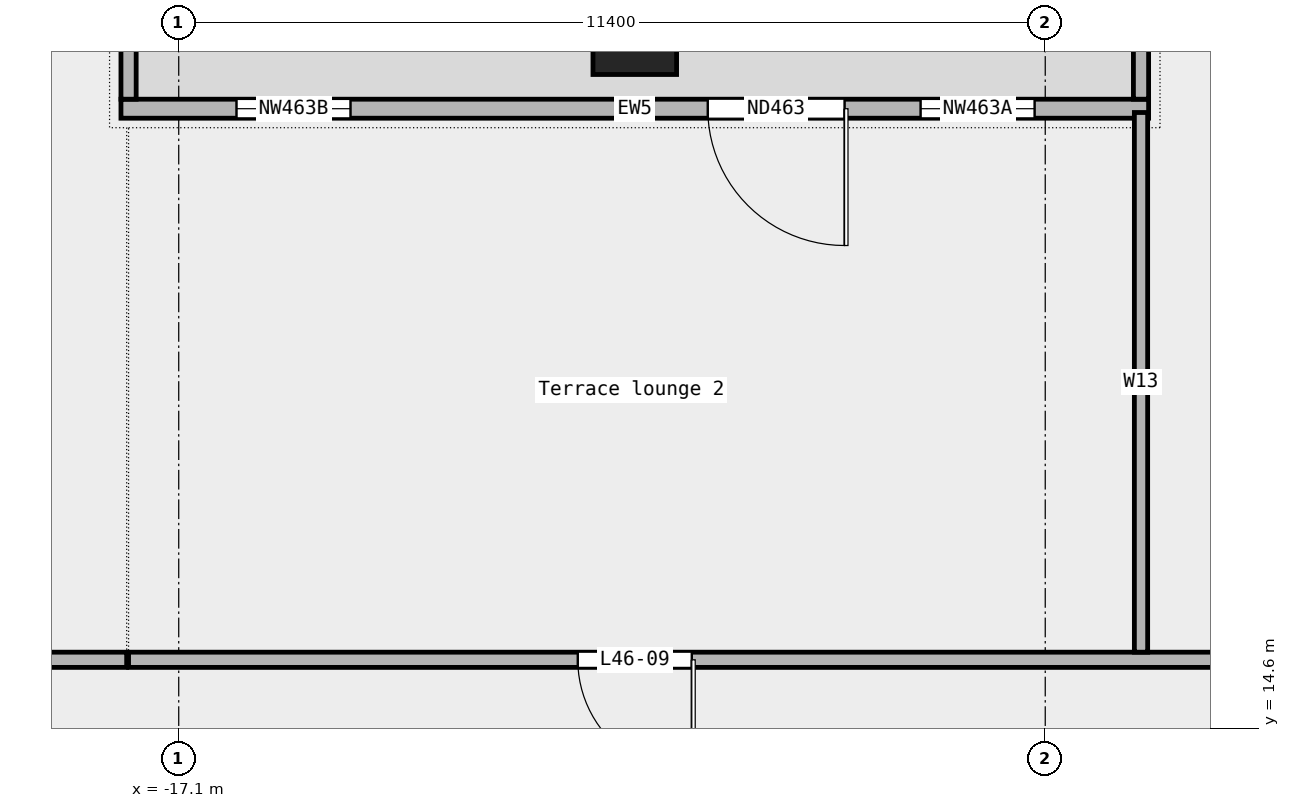
"""IFC4 building model, lengths in metres.
Left out: names, types, materials, properties, quantities, classifications, styles, units other than length and angle.
Written with IfcOpenShell. Run it as: python <this file> out.ifc"""

import sys

from ifc_helpers import new_model, si_unit, direction, frame, frame_2d, origin, origin_2d, place, context, subcontext, project, spatial, rectangle, extrude, element, fill, save


model = new_model("IFC4")
c1 = context("Model", 3, precision=1e-05, world=origin(), true_north=direction((0.0, 1.0)))
c2 = subcontext(c1, "Body", "Model", "MODEL_VIEW")
j1 = project(units=[si_unit("LENGTHUNIT", "METRE"), si_unit("PLANEANGLEUNIT", "RADIAN")], contexts=[c1])
p1 = place(None, origin())
s1 = spatial("IfcSite", under=j1, at=p1, CompositionType="ELEMENT")
p2 = place(p1, origin())
s2 = spatial("IfcBuilding", under=s1, at=p2, CompositionType="ELEMENT")
p3 = place(p2, frame((0.0, 0.0, 219.0)))
s3 = spatial("IfcBuildingStorey", under=s2, at=p3, CompositionType="ELEMENT", Elevation=219.0)
p4 = place(p3, frame((-11.1, 23.75, 0.0), z_axis=(0.0, 0.0, 1.0), x_axis=(1.0, 0.0, 0.0)))
e1 = element("IfcColumn", 1, at=p4, inside=s3, PredefinedType="COLUMN", context=c2, shape_type="SweptSolid", body=[
    extrude(rectangle(XDim=1.1, YDim=1.1, at=origin_2d()), origin(), (0.0, 0.0, 1.0), 3.6),
])
p5 = place(p3, frame((-4.34, 22.75, 0.0), z_axis=(0.0, 0.0, 1.0), x_axis=(-1.0, 0.0, 0.0)))
e2 = element("IfcWall", 2, at=p5, inside=s3, PredefinedType="STANDARD", context=c2, shape_type="SweptSolid", body=[
    extrude(rectangle(XDim=13.52, YDim=0.25, at=frame_2d((6.76, 0.0))), origin(), (0.0, 0.0, 1.0), 3.6),
])
p6 = place(p5, frame((1.5, 0.0, 0.45)))
e3 = element("IfcOpeningElement", 3, at=p6, cuts=e2, PredefinedType="OPENING", context=c2, shape_type="SweptSolid", body=[
    extrude(rectangle(XDim=1.5, YDim=2.4, at=frame_2d((0.75, 1.2))), frame((0.0, 0.137, 0.0), z_axis=(0.0, -1.0, 0.0), x_axis=(1.0, 0.0, 0.0)), (0.0, 0.0, 1.0), 0.274),
])
p7 = place(p5, frame((4.0, 0.0, 0.0)))
e4 = element("IfcOpeningElement", 4, at=p7, cuts=e2, PredefinedType="OPENING", context=c2, shape_type="SweptSolid", body=[
    extrude(rectangle(XDim=1.8, YDim=2.4, at=frame_2d((0.9, 1.2))), frame((0.0, 0.137, 0.0), z_axis=(0.0, -1.0, 0.0), x_axis=(1.0, 0.0, 0.0)), (0.0, 0.0, 1.0), 0.274),
])
p8 = place(p5, frame((10.5, 0.0, 0.45)))
e5 = element("IfcOpeningElement", 5, at=p8, cuts=e2, PredefinedType="OPENING", context=c2, shape_type="SweptSolid", body=[
    extrude(rectangle(XDim=1.5, YDim=2.4, at=frame_2d((0.75, 1.2))), frame((0.0, 0.137, 0.0), z_axis=(0.0, -1.0, 0.0), x_axis=(1.0, 0.0, 0.0)), (0.0, 0.0, 1.0), 0.274),
])
for number, where, z_axis, x_axis in (
    (6, (-4.44, 24.75, 0.0), (0.0, 0.0, 1.0), (0.0, -1.0, 0.0)),
    (7, (-17.76, 24.75, 0.0), (0.0, 0.0, 1.0), (0.0, -1.0, 0.0)),
):
    element("IfcWall", number, at=place(p3, frame(where, z_axis=z_axis, x_axis=x_axis)), inside=s3, PredefinedType="STANDARD", context=c2, shape_type="SweptSolid", body=[
        extrude(rectangle(XDim=1.875, YDim=0.2, at=frame_2d((0.938, 0.0))), origin(), (0.0, 0.0, 1.0), 3.6),
    ])
p9 = place(p3, frame((-28.15, 15.5, 0.0), z_axis=(0.0, 0.0, 1.0), x_axis=(1.0, 0.0, 0.0)))
e8 = element("IfcWall", 8, at=p9, inside=s3, PredefinedType="PARTITIONING", context=c2, shape_type="SweptSolid", body=[
    extrude(rectangle(XDim=10.365, YDim=0.2, at=frame_2d((5.183, 0.0))), origin(), (0.0, 0.0, 1.0), 3.6),
])
p10 = place(p9, frame((4.683, 0.0, 0.0)))
e9 = element("IfcOpeningElement", 9, at=p10, cuts=e8, PredefinedType="OPENING", context=c2, shape_type="SweptSolid", body=[
    extrude(rectangle(XDim=1.2, YDim=2.1, at=frame_2d((0.6, 1.05))), frame((0.0, 0.112, 0.0), z_axis=(0.0, -1.0, 0.0), x_axis=(1.0, 0.0, 0.0)), (0.0, 0.0, 1.0), 0.224),
])
p11 = place(p3, frame((-17.76, 15.5, 0.0), z_axis=(0.0, 0.0, 1.0), x_axis=(1.0, 0.0, 0.0)))
e10 = element("IfcWall", 10, at=p11, inside=s3, PredefinedType="PARTITIONING", context=c2, shape_type="SweptSolid", body=[
    extrude(rectangle(XDim=45.91, YDim=0.2, at=frame_2d((22.955, 0.0))), origin(), (0.0, 0.0, 1.0), 3.6),
])
p12 = place(p11, frame((37.337, 0.0, 0.0)))
e11 = element("IfcOpeningElement", 11, at=p12, cuts=e10, PredefinedType="OPENING", context=c2, shape_type="SweptSolid", body=[
    extrude(rectangle(XDim=1.5, YDim=2.1, at=frame_2d((0.75, 1.05))), frame((0.0, 0.112, 0.0), z_axis=(0.0, -1.0, 0.0), x_axis=(1.0, 0.0, 0.0)), (0.0, 0.0, 1.0), 0.224),
])
p13 = place(p11, frame((24.633, 0.0, 0.0)))
e12 = element("IfcOpeningElement", 12, at=p13, cuts=e10, PredefinedType="OPENING", context=c2, shape_type="SweptSolid", body=[
    extrude(rectangle(XDim=1.5, YDim=2.1, at=frame_2d((0.75, 1.05))), frame((0.0, 0.112, 0.0), z_axis=(0.0, -1.0, 0.0), x_axis=(1.0, 0.0, 0.0)), (0.0, 0.0, 1.0), 0.224),
])
p14 = place(p11, frame((5.91, 0.0, 0.0)))
e13 = element("IfcOpeningElement", 13, at=p14, cuts=e10, PredefinedType="OPENING", context=c2, shape_type="SweptSolid", body=[
    extrude(rectangle(XDim=1.5, YDim=2.1, at=frame_2d((0.75, 1.05))), frame((0.0, 0.112, 0.0), z_axis=(0.0, -1.0, 0.0), x_axis=(1.0, 0.0, 0.0)), (0.0, 0.0, 1.0), 0.224),
])
p15 = place(p11, frame((16.21, 0.0, 0.0)))
e14 = element("IfcOpeningElement", 14, at=p15, cuts=e10, PredefinedType="OPENING", context=c2, shape_type="SweptSolid", body=[
    extrude(rectangle(XDim=1.2, YDim=2.1, at=frame_2d((0.6, 1.05))), frame((0.0, 0.112, 0.0), z_axis=(0.0, -1.0, 0.0), x_axis=(1.0, 0.0, 0.0)), (0.0, 0.0, 1.0), 0.224),
])
p16 = place(p3, frame((-4.44, 15.6, 0.0), z_axis=(0.0, 0.0, 1.0), x_axis=(0.0, 1.0, 0.0)))
e15 = element("IfcWall", 15, at=p16, inside=s3, PredefinedType="PARTITIONING", context=c2, shape_type="SweptSolid", body=[
    extrude(rectangle(XDim=7.1, YDim=0.175, at=frame_2d((3.55, 0.0))), origin(), (0.0, 0.0, 1.0), 3.6),
])
p17 = place(p6, origin())
e16 = element("IfcWindow", 16, at=p17, inside=s3, PartitioningType="SINGLE_PANEL", PredefinedType="WINDOW", context=c2, shape_type="SweptSolid", body=[
    extrude(rectangle(XDim=1.5, YDim=2.4, at=frame_2d((0.75, 1.2))), frame((0.0, 0.03, 0.0), z_axis=(0.0, -1.0, 0.0), x_axis=(1.0, 0.0, 0.0)), (0.0, 0.0, 1.0), 0.06),
])
fill(e3, e16)
p18 = place(p7, origin())
e17 = element("IfcDoor", 17, at=p18, inside=s3, OperationType="DOUBLE_DOOR_SINGLE_SWING", PredefinedType="DOOR", context=c2, shape_type="SweptSolid", body=[
    extrude(rectangle(XDim=1.8, YDim=2.4, at=frame_2d((0.9, 1.2))), frame((0.0, 0.025, 0.0), z_axis=(0.0, -1.0, 0.0), x_axis=(1.0, 0.0, 0.0)), (0.0, 0.0, 1.0), 0.05),
])
fill(e4, e17)
p19 = place(p8, origin())
e18 = element("IfcWindow", 18, at=p19, inside=s3, PartitioningType="SINGLE_PANEL", PredefinedType="WINDOW", context=c2, shape_type="SweptSolid", body=[
    extrude(rectangle(XDim=1.5, YDim=2.4, at=frame_2d((0.75, 1.2))), frame((0.0, 0.03, 0.0), z_axis=(0.0, -1.0, 0.0), x_axis=(1.0, 0.0, 0.0)), (0.0, 0.0, 1.0), 0.06),
])
fill(e5, e18)
p20 = place(p14, origin())
e19 = element("IfcDoor", 19, at=p20, inside=s3, OperationType="DOUBLE_DOOR_SINGLE_SWING", PredefinedType="DOOR", context=c2, shape_type="SweptSolid", body=[
    extrude(rectangle(XDim=1.5, YDim=2.1, at=frame_2d((0.75, 1.05))), frame((0.0, 0.025, 0.0), z_axis=(0.0, -1.0, 0.0), x_axis=(1.0, 0.0, 0.0)), (0.0, 0.0, 1.0), 0.05),
])
fill(e13, e19)
save(model, sys.argv[1])
